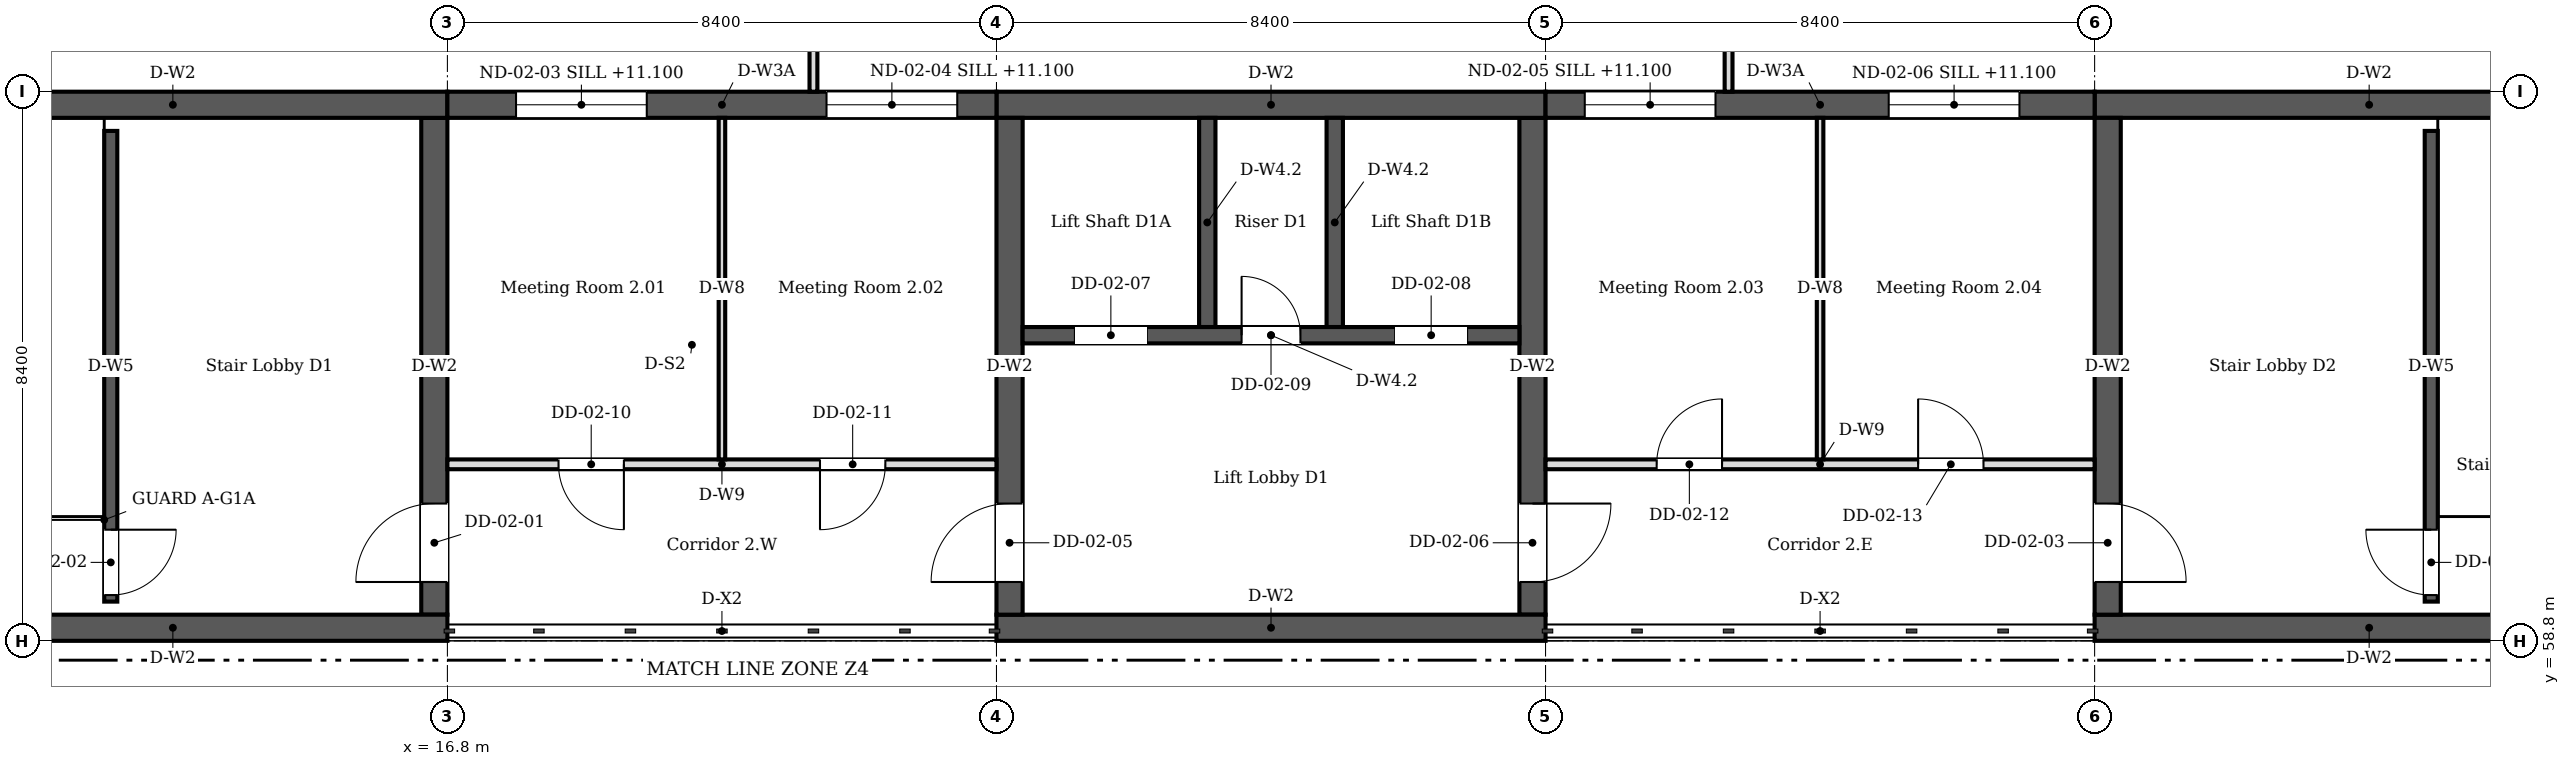
"""IFC4 building model, lengths in metres.
Left out: names, types, materials, properties, quantities, classifications, styles, units other than length and angle.
Written with IfcOpenShell. Run it as: python <this file> out.ifc"""

import sys

from ifc_helpers import new_model, si_unit, direction, frame, frame_2d, origin, place, context, subcontext, project, spatial, rectangle, extrude, element, fill, save


model = new_model("IFC4")
c1 = context("Model", 3, precision=1e-05, world=origin(), true_north=direction((0.0, 1.0)))
c2 = subcontext(c1, "Body", "Model", "MODEL_VIEW")
j1 = project(units=[si_unit("LENGTHUNIT", "METRE"), si_unit("PLANEANGLEUNIT", "RADIAN")], contexts=[c1])
p1 = place(None, origin())
s1 = spatial("IfcSite", under=j1, at=p1, CompositionType="ELEMENT")
p2 = place(p1, origin())
s2 = spatial("IfcBuilding", under=s1, at=p2, CompositionType="ELEMENT")
p3 = place(p2, frame((0.0, 0.0, 10.2)))
s3 = spatial("IfcBuildingStorey", under=s2, at=p3, CompositionType="ELEMENT", Elevation=10.2)
for number, where, z_axis, x_axis in (
    (1, (8.4, 59.0, 0.0), (0.0, 0.0, 1.0), (1.0, 0.0, 0.0)),
    (2, (8.4, 67.0, 0.0), (0.0, 0.0, 1.0), (1.0, 0.0, 0.0)),
):
    element("IfcWall", number, at=place(p3, frame(where, z_axis=z_axis, x_axis=x_axis)), inside=s3, PredefinedType="SOLIDWALL", context=c2, shape_type="SweptSolid", body=[
        extrude(rectangle(XDim=8.4, YDim=0.4, at=frame_2d((4.2, 0.0))), origin(), (0.0, 0.0, 1.0), 3.92),
    ])
p4 = place(p3, frame((16.6, 59.2, 0.0), z_axis=(0.0, 0.0, 1.0), x_axis=(0.0, 1.0, 0.0)))
e3 = element("IfcWall", 3, at=p4, inside=s3, PredefinedType="SOLIDWALL", context=c2, shape_type="SweptSolid", body=[
    extrude(rectangle(XDim=7.6, YDim=0.4, at=frame_2d((3.8, 0.0))), origin(), (0.0, 0.0, 1.0), 3.92),
])
p5 = place(p4, frame((0.5, 0.0, 0.0)))
e4 = element("IfcOpeningElement", 4, at=p5, cuts=e3, PredefinedType="OPENING", context=c2, shape_type="SweptSolid", body=[
    extrude(rectangle(XDim=1.2, YDim=2.1, at=frame_2d((0.6, 1.05))), frame((0.0, 0.21, 0.0), z_axis=(0.0, -1.0, 0.0), x_axis=(1.0, 0.0, 0.0)), (0.0, 0.0, 1.0), 0.42),
])
for number, where, z_axis, x_axis in (
    (5, (25.2, 59.0, 0.0), (0.0, 0.0, 1.0), (1.0, 0.0, 0.0)),
    (6, (25.2, 67.0, 0.0), (0.0, 0.0, 1.0), (1.0, 0.0, 0.0)),
):
    element("IfcWall", number, at=place(p3, frame(where, z_axis=z_axis, x_axis=x_axis)), inside=s3, PredefinedType="SOLIDWALL", context=c2, shape_type="SweptSolid", body=[
        extrude(rectangle(XDim=8.4, YDim=0.4, at=frame_2d((4.2, 0.0))), origin(), (0.0, 0.0, 1.0), 3.92),
    ])
p6 = place(p3, frame((25.4, 59.2, 0.0), z_axis=(0.0, 0.0, 1.0), x_axis=(0.0, 1.0, 0.0)))
e7 = element("IfcWall", 7, at=p6, inside=s3, PredefinedType="SOLIDWALL", context=c2, shape_type="SweptSolid", body=[
    extrude(rectangle(XDim=7.6, YDim=0.4, at=frame_2d((3.8, 0.0))), origin(), (0.0, 0.0, 1.0), 3.92),
])
p7 = place(p6, frame((0.5, 0.0, 0.0)))
e8 = element("IfcOpeningElement", 8, at=p7, cuts=e7, PredefinedType="OPENING", context=c2, shape_type="SweptSolid", body=[
    extrude(rectangle(XDim=1.2, YDim=2.1, at=frame_2d((0.6, 1.05))), frame((0.0, 0.21, 0.0), z_axis=(0.0, -1.0, 0.0), x_axis=(1.0, 0.0, 0.0)), (0.0, 0.0, 1.0), 0.42),
])
p8 = place(p3, frame((33.4, 59.2, 0.0), z_axis=(0.0, 0.0, 1.0), x_axis=(0.0, 1.0, 0.0)))
e9 = element("IfcWall", 9, at=p8, inside=s3, PredefinedType="SOLIDWALL", context=c2, shape_type="SweptSolid", body=[
    extrude(rectangle(XDim=7.6, YDim=0.4, at=frame_2d((3.8, 0.0))), origin(), (0.0, 0.0, 1.0), 3.92),
])
p9 = place(p8, frame((0.5, 0.0, 0.0)))
e10 = element("IfcOpeningElement", 10, at=p9, cuts=e9, PredefinedType="OPENING", context=c2, shape_type="SweptSolid", body=[
    extrude(rectangle(XDim=1.2, YDim=2.1, at=frame_2d((0.6, 1.05))), frame((0.0, 0.21, 0.0), z_axis=(0.0, -1.0, 0.0), x_axis=(1.0, 0.0, 0.0)), (0.0, 0.0, 1.0), 0.42),
])
for number, where, z_axis, x_axis in (
    (11, (42.0, 59.0, 0.0), (0.0, 0.0, 1.0), (1.0, 0.0, 0.0)),
    (12, (42.0, 67.0, 0.0), (0.0, 0.0, 1.0), (1.0, 0.0, 0.0)),
):
    element("IfcWall", number, at=place(p3, frame(where, z_axis=z_axis, x_axis=x_axis)), inside=s3, PredefinedType="SOLIDWALL", context=c2, shape_type="SweptSolid", body=[
        extrude(rectangle(XDim=8.4, YDim=0.4, at=frame_2d((4.2, 0.0))), origin(), (0.0, 0.0, 1.0), 3.92),
    ])
p10 = place(p3, frame((42.2, 59.2, 0.0), z_axis=(0.0, 0.0, 1.0), x_axis=(0.0, 1.0, 0.0)))
e13 = element("IfcWall", 13, at=p10, inside=s3, PredefinedType="SOLIDWALL", context=c2, shape_type="SweptSolid", body=[
    extrude(rectangle(XDim=7.6, YDim=0.4, at=frame_2d((3.8, 0.0))), origin(), (0.0, 0.0, 1.0), 3.92),
])
p11 = place(p10, frame((0.5, 0.0, 0.0)))
e14 = element("IfcOpeningElement", 14, at=p11, cuts=e13, PredefinedType="OPENING", context=c2, shape_type="SweptSolid", body=[
    extrude(rectangle(XDim=1.2, YDim=2.1, at=frame_2d((0.6, 1.05))), frame((0.0, 0.21, 0.0), z_axis=(0.0, -1.0, 0.0), x_axis=(1.0, 0.0, 0.0)), (0.0, 0.0, 1.0), 0.42),
])
p12 = place(p3, frame((25.6, 63.475, 0.0), z_axis=(0.0, 0.0, 1.0), x_axis=(1.0, 0.0, 0.0)))
e15 = element("IfcWall", 15, at=p12, inside=s3, PredefinedType="SOLIDWALL", context=c2, shape_type="SweptSolid", body=[
    extrude(rectangle(XDim=7.6, YDim=0.25, at=frame_2d((3.8, 0.0))), origin(), (0.0, 0.0, 1.0), 4.8),
])
p13 = place(p12, frame((0.8, 0.0, 0.0)))
e16 = element("IfcOpeningElement", 16, at=p13, cuts=e15, PredefinedType="OPENING", context=c2, shape_type="SweptSolid", body=[
    extrude(rectangle(XDim=1.1, YDim=2.1, at=frame_2d((0.55, 1.05))), frame((0.0, 0.135, 0.0), z_axis=(0.0, -1.0, 0.0), x_axis=(1.0, 0.0, 0.0)), (0.0, 0.0, 1.0), 0.27),
])
p14 = place(p12, frame((5.7, 0.0, 0.0)))
e17 = element("IfcOpeningElement", 17, at=p14, cuts=e15, PredefinedType="OPENING", context=c2, shape_type="SweptSolid", body=[
    extrude(rectangle(XDim=1.1, YDim=2.1, at=frame_2d((0.55, 1.05))), frame((0.0, 0.135, 0.0), z_axis=(0.0, -1.0, 0.0), x_axis=(1.0, 0.0, 0.0)), (0.0, 0.0, 1.0), 0.27),
])
p15 = place(p12, frame((3.35, 0.0, 0.0)))
e18 = element("IfcOpeningElement", 18, at=p15, cuts=e15, PredefinedType="OPENING", context=c2, shape_type="SweptSolid", body=[
    extrude(rectangle(XDim=0.9, YDim=2.1, at=frame_2d((0.45, 1.05))), frame((0.0, 0.135, 0.0), z_axis=(0.0, -1.0, 0.0), x_axis=(1.0, 0.0, 0.0)), (0.0, 0.0, 1.0), 0.27),
])
for number, where, z_axis, x_axis in (
    (19, (28.425, 63.6, 0.0), (0.0, 0.0, 1.0), (0.0, 1.0, 0.0)),
    (20, (30.375, 63.6, 0.0), (0.0, 0.0, 1.0), (0.0, 1.0, 0.0)),
):
    element("IfcWall", number, at=place(p3, frame(where, z_axis=z_axis, x_axis=x_axis)), inside=s3, PredefinedType="SOLIDWALL", context=c2, shape_type="SweptSolid", body=[
        extrude(rectangle(XDim=3.2, YDim=0.25, at=frame_2d((1.6, 0.0))), origin(), (0.0, 0.0, 1.0), 4.8),
    ])
p16 = place(p3, frame((11.65, 59.4, 0.0), z_axis=(0.0, 0.0, 1.0), x_axis=(0.0, 1.0, 0.0)))
e21 = element("IfcWall", 21, at=p16, inside=s3, PredefinedType="SOLIDWALL", context=c2, shape_type="SweptSolid", body=[
    extrude(rectangle(XDim=7.2, YDim=0.2, at=frame_2d((3.6, 0.0))), origin(), (0.0, 0.0, 1.0), 3.92),
])
p17 = place(p16, frame((0.1, 0.0, 0.0)))
e22 = element("IfcOpeningElement", 22, at=p17, cuts=e21, PredefinedType="OPENING", context=c2, shape_type="SweptSolid", body=[
    extrude(rectangle(XDim=1.0, YDim=2.1, at=frame_2d((0.5, 1.05))), frame((0.0, 0.11, 0.0), z_axis=(0.0, -1.0, 0.0), x_axis=(1.0, 0.0, 0.0)), (0.0, 0.0, 1.0), 0.22),
])
p18 = place(p3, frame((47.15, 59.4, 0.0), z_axis=(0.0, 0.0, 1.0), x_axis=(0.0, 1.0, 0.0)))
e23 = element("IfcWall", 23, at=p18, inside=s3, PredefinedType="SOLIDWALL", context=c2, shape_type="SweptSolid", body=[
    extrude(rectangle(XDim=7.2, YDim=0.2, at=frame_2d((3.6, 0.0))), origin(), (0.0, 0.0, 1.0), 3.92),
])
p19 = place(p18, frame((0.1, 0.0, 0.0)))
e24 = element("IfcOpeningElement", 24, at=p19, cuts=e23, PredefinedType="OPENING", context=c2, shape_type="SweptSolid", body=[
    extrude(rectangle(XDim=1.0, YDim=2.1, at=frame_2d((0.5, 1.05))), frame((0.0, 0.11, 0.0), z_axis=(0.0, -1.0, 0.0), x_axis=(1.0, 0.0, 0.0)), (0.0, 0.0, 1.0), 0.22),
])
p20 = place(p2, origin())
s4 = spatial("IfcBuildingStorey", under=s2, at=p20, CompositionType="ELEMENT", Elevation=0.0)
for number, where, z_axis, x_axis in (
    (25, (22.4, 67.2, 0.0), (0.0, 0.0, 1.0), (0.0, 1.0, 0.0)),
    (26, (36.4, 67.2, 0.0), (0.0, 0.0, 1.0), (0.0, 1.0, 0.0)),
):
    element("IfcWall", number, at=place(p20, frame(where, z_axis=z_axis, x_axis=x_axis)), inside=s4, PredefinedType="MOVABLE", context=c2, shape_type="SweptSolid", body=[
        extrude(rectangle(XDim=33.6, YDim=0.12, at=frame_2d((16.8, 0.0))), origin(), (0.0, 0.0, 1.0), 14.467),
    ])
p21 = place(p3, frame((16.8, 67.0, 0.0), z_axis=(0.0, 0.0, 1.0), x_axis=(1.0, 0.0, 0.0)))
e27 = element("IfcWall", 27, at=p21, inside=s3, PredefinedType="SOLIDWALL", context=c2, shape_type="SweptSolid", body=[
    extrude(rectangle(XDim=8.4, YDim=0.4, at=frame_2d((4.2, 0.0))), origin(), (0.0, 0.0, 1.0), 3.42),
])
p22 = place(p21, frame((1.05, 0.0, 0.9)))
e28 = element("IfcOpeningElement", 28, at=p22, cuts=e27, PredefinedType="OPENING", context=c2, shape_type="SweptSolid", body=[
    extrude(rectangle(XDim=2.0, YDim=1.2, at=frame_2d((1.0, 0.6))), frame((0.0, 0.21, 0.0), z_axis=(0.0, -1.0, 0.0), x_axis=(1.0, 0.0, 0.0)), (0.0, 0.0, 1.0), 0.42),
])
p23 = place(p21, frame((5.8, 0.0, 0.9)))
e29 = element("IfcOpeningElement", 29, at=p23, cuts=e27, PredefinedType="OPENING", context=c2, shape_type="SweptSolid", body=[
    extrude(rectangle(XDim=2.0, YDim=1.2, at=frame_2d((1.0, 0.6))), frame((0.0, 0.21, 0.0), z_axis=(0.0, -1.0, 0.0), x_axis=(1.0, 0.0, 0.0)), (0.0, 0.0, 1.0), 0.42),
])
p24 = place(p3, frame((33.6, 67.0, 0.0), z_axis=(0.0, 0.0, 1.0), x_axis=(1.0, 0.0, 0.0)))
e30 = element("IfcWall", 30, at=p24, inside=s3, PredefinedType="SOLIDWALL", context=c2, shape_type="SweptSolid", body=[
    extrude(rectangle(XDim=8.4, YDim=0.4, at=frame_2d((4.2, 0.0))), origin(), (0.0, 0.0, 1.0), 3.42),
])
p25 = place(p24, frame((0.6, 0.0, 0.9)))
e31 = element("IfcOpeningElement", 31, at=p25, cuts=e30, PredefinedType="OPENING", context=c2, shape_type="SweptSolid", body=[
    extrude(rectangle(XDim=2.0, YDim=1.2, at=frame_2d((1.0, 0.6))), frame((0.0, 0.21, 0.0), z_axis=(0.0, -1.0, 0.0), x_axis=(1.0, 0.0, 0.0)), (0.0, 0.0, 1.0), 0.42),
])
p26 = place(p24, frame((5.25, 0.0, 0.9)))
e32 = element("IfcOpeningElement", 32, at=p26, cuts=e30, PredefinedType="OPENING", context=c2, shape_type="SweptSolid", body=[
    extrude(rectangle(XDim=2.0, YDim=1.2, at=frame_2d((1.0, 0.6))), frame((0.0, 0.21, 0.0), z_axis=(0.0, -1.0, 0.0), x_axis=(1.0, 0.0, 0.0)), (0.0, 0.0, 1.0), 0.42),
])
p27 = place(p3, frame((16.8, 61.5, 0.0), z_axis=(0.0, 0.0, 1.0), x_axis=(1.0, 0.0, 0.0)))
e33 = element("IfcWall", 33, at=p27, inside=s3, PredefinedType="PARTITIONING", context=c2, shape_type="SweptSolid", body=[
    extrude(rectangle(XDim=8.4, YDim=0.15, at=frame_2d((4.2, 0.0))), origin(), (0.0, 0.0, 1.0), 3.92),
])
p28 = place(p27, frame((1.7, 0.0, 0.0)))
e34 = element("IfcOpeningElement", 34, at=p28, cuts=e33, PredefinedType="OPENING", context=c2, shape_type="SweptSolid", body=[
    extrude(rectangle(XDim=1.0, YDim=2.1, at=frame_2d((0.5, 1.05))), frame((0.0, 0.085, 0.0), z_axis=(0.0, -1.0, 0.0), x_axis=(1.0, 0.0, 0.0)), (0.0, 0.0, 1.0), 0.17),
])
p29 = place(p27, frame((5.7, 0.0, 0.0)))
e35 = element("IfcOpeningElement", 35, at=p29, cuts=e33, PredefinedType="OPENING", context=c2, shape_type="SweptSolid", body=[
    extrude(rectangle(XDim=1.0, YDim=2.1, at=frame_2d((0.5, 1.05))), frame((0.0, 0.085, 0.0), z_axis=(0.0, -1.0, 0.0), x_axis=(1.0, 0.0, 0.0)), (0.0, 0.0, 1.0), 0.17),
])
p30 = place(p3, frame((21.0, 61.575, 0.0), z_axis=(0.0, 0.0, 1.0), x_axis=(0.0, 1.0, 0.0)))
e36 = element("IfcWall", 36, at=p30, inside=s3, PredefinedType="PARTITIONING", context=c2, shape_type="SweptSolid", body=[
    extrude(rectangle(XDim=5.225, YDim=0.1, at=frame_2d((2.613, 0.0))), origin(), (0.0, 0.0, 1.0), 3.92),
])
p31 = place(p3, frame((33.6, 61.5, 0.0), z_axis=(0.0, 0.0, 1.0), x_axis=(1.0, 0.0, 0.0)))
e37 = element("IfcWall", 37, at=p31, inside=s3, PredefinedType="PARTITIONING", context=c2, shape_type="SweptSolid", body=[
    extrude(rectangle(XDim=8.4, YDim=0.15, at=frame_2d((4.2, 0.0))), origin(), (0.0, 0.0, 1.0), 3.92),
])
p32 = place(p31, frame((1.7, 0.0, 0.0)))
e38 = element("IfcOpeningElement", 38, at=p32, cuts=e37, PredefinedType="OPENING", context=c2, shape_type="SweptSolid", body=[
    extrude(rectangle(XDim=1.0, YDim=2.1, at=frame_2d((0.5, 1.05))), frame((0.0, 0.085, 0.0), z_axis=(0.0, -1.0, 0.0), x_axis=(1.0, 0.0, 0.0)), (0.0, 0.0, 1.0), 0.17),
])
p33 = place(p31, frame((5.7, 0.0, 0.0)))
e39 = element("IfcOpeningElement", 39, at=p33, cuts=e37, PredefinedType="OPENING", context=c2, shape_type="SweptSolid", body=[
    extrude(rectangle(XDim=1.0, YDim=2.1, at=frame_2d((0.5, 1.05))), frame((0.0, 0.085, 0.0), z_axis=(0.0, -1.0, 0.0), x_axis=(1.0, 0.0, 0.0)), (0.0, 0.0, 1.0), 0.17),
])
p34 = place(p3, frame((37.8, 61.575, 0.0), z_axis=(0.0, 0.0, 1.0), x_axis=(0.0, 1.0, 0.0)))
e40 = element("IfcWall", 40, at=p34, inside=s3, PredefinedType="PARTITIONING", context=c2, shape_type="SweptSolid", body=[
    extrude(rectangle(XDim=5.225, YDim=0.1, at=frame_2d((2.613, 0.0))), origin(), (0.0, 0.0, 1.0), 3.92),
])
p35 = place(p5, origin())
e41 = element("IfcDoor", 41, at=p35, inside=s3, OperationType="SINGLE_SWING_LEFT", PredefinedType="DOOR", context=c2, shape_type="SweptSolid", body=[
    extrude(rectangle(XDim=1.2, YDim=2.1, at=frame_2d((0.6, 1.05))), frame((0.0, 0.025, 0.0), z_axis=(0.0, -1.0, 0.0), x_axis=(1.0, 0.0, 0.0)), (0.0, 0.0, 1.0), 0.05),
])
fill(e4, e41)
p36 = place(p17, origin())
e42 = element("IfcDoor", 42, at=p36, inside=s3, OperationType="SINGLE_SWING_LEFT", PredefinedType="DOOR", context=c2, shape_type="SweptSolid", body=[
    extrude(rectangle(XDim=1.0, YDim=2.1, at=frame_2d((0.5, 1.05))), frame((0.0, 0.025, 0.0), z_axis=(0.0, -1.0, 0.0), x_axis=(1.0, 0.0, 0.0)), (0.0, 0.0, 1.0), 0.05),
])
fill(e22, e42)
p37 = place(p11, origin())
e43 = element("IfcDoor", 43, at=p37, inside=s3, OperationType="SINGLE_SWING_LEFT", PredefinedType="DOOR", context=c2, shape_type="SweptSolid", body=[
    extrude(rectangle(XDim=1.2, YDim=2.1, at=frame_2d((0.6, 1.05))), frame((0.0, 0.025, 0.0), z_axis=(0.0, -1.0, 0.0), x_axis=(1.0, 0.0, 0.0)), (0.0, 0.0, 1.0), 0.05),
])
fill(e14, e43)
p38 = place(p19, origin())
e44 = element("IfcDoor", 44, at=p38, inside=s3, OperationType="SINGLE_SWING_LEFT", PredefinedType="DOOR", context=c2, shape_type="SweptSolid", body=[
    extrude(rectangle(XDim=1.0, YDim=2.1, at=frame_2d((0.5, 1.05))), frame((0.0, 0.025, 0.0), z_axis=(0.0, -1.0, 0.0), x_axis=(1.0, 0.0, 0.0)), (0.0, 0.0, 1.0), 0.05),
])
fill(e24, e44)
p39 = place(p7, origin())
e45 = element("IfcDoor", 45, at=p39, inside=s3, OperationType="SINGLE_SWING_LEFT", PredefinedType="DOOR", context=c2, shape_type="SweptSolid", body=[
    extrude(rectangle(XDim=1.2, YDim=2.1, at=frame_2d((0.6, 1.05))), frame((0.0, 0.025, 0.0), z_axis=(0.0, -1.0, 0.0), x_axis=(1.0, 0.0, 0.0)), (0.0, 0.0, 1.0), 0.05),
])
fill(e8, e45)
p40 = place(p9, origin())
e46 = element("IfcDoor", 46, at=p40, inside=s3, OperationType="SINGLE_SWING_LEFT", PredefinedType="DOOR", context=c2, shape_type="SweptSolid", body=[
    extrude(rectangle(XDim=1.2, YDim=2.1, at=frame_2d((0.6, 1.05))), frame((0.0, 0.025, 0.0), z_axis=(0.0, -1.0, 0.0), x_axis=(1.0, 0.0, 0.0)), (0.0, 0.0, 1.0), 0.05),
])
fill(e10, e46)
p41 = place(p13, origin())
e47 = element("IfcDoor", 47, at=p41, inside=s3, OperationType="DOUBLE_DOOR_SLIDING", PredefinedType="DOOR", context=c2, shape_type="SweptSolid", body=[
    extrude(rectangle(XDim=1.1, YDim=2.1, at=frame_2d((0.55, 1.05))), frame((0.0, 0.025, 0.0), z_axis=(0.0, -1.0, 0.0), x_axis=(1.0, 0.0, 0.0)), (0.0, 0.0, 1.0), 0.05),
])
fill(e16, e47)
p42 = place(p14, origin())
e48 = element("IfcDoor", 48, at=p42, inside=s3, OperationType="DOUBLE_DOOR_SLIDING", PredefinedType="DOOR", context=c2, shape_type="SweptSolid", body=[
    extrude(rectangle(XDim=1.1, YDim=2.1, at=frame_2d((0.55, 1.05))), frame((0.0, 0.025, 0.0), z_axis=(0.0, -1.0, 0.0), x_axis=(1.0, 0.0, 0.0)), (0.0, 0.0, 1.0), 0.05),
])
fill(e17, e48)
p43 = place(p15, origin())
e49 = element("IfcDoor", 49, at=p43, inside=s3, OperationType="SINGLE_SWING_LEFT", PredefinedType="DOOR", context=c2, shape_type="SweptSolid", body=[
    extrude(rectangle(XDim=0.9, YDim=2.1, at=frame_2d((0.45, 1.05))), frame((0.0, 0.025, 0.0), z_axis=(0.0, -1.0, 0.0), x_axis=(1.0, 0.0, 0.0)), (0.0, 0.0, 1.0), 0.05),
])
fill(e18, e49)
p44 = place(p22, origin())
e50 = element("IfcWindow", 50, at=p44, inside=s3, PartitioningType="SINGLE_PANEL", PredefinedType="WINDOW", context=c2, shape_type="SweptSolid", body=[
    extrude(rectangle(XDim=2.0, YDim=1.2, at=frame_2d((1.0, 0.6))), frame((0.0, 0.03, 0.0), z_axis=(0.0, -1.0, 0.0), x_axis=(1.0, 0.0, 0.0)), (0.0, 0.0, 1.0), 0.06),
])
fill(e28, e50)
p45 = place(p23, origin())
e51 = element("IfcWindow", 51, at=p45, inside=s3, PartitioningType="SINGLE_PANEL", PredefinedType="WINDOW", context=c2, shape_type="SweptSolid", body=[
    extrude(rectangle(XDim=2.0, YDim=1.2, at=frame_2d((1.0, 0.6))), frame((0.0, 0.03, 0.0), z_axis=(0.0, -1.0, 0.0), x_axis=(1.0, 0.0, 0.0)), (0.0, 0.0, 1.0), 0.06),
])
fill(e29, e51)
p46 = place(p25, origin())
e52 = element("IfcWindow", 52, at=p46, inside=s3, PartitioningType="SINGLE_PANEL", PredefinedType="WINDOW", context=c2, shape_type="SweptSolid", body=[
    extrude(rectangle(XDim=2.0, YDim=1.2, at=frame_2d((1.0, 0.6))), frame((0.0, 0.03, 0.0), z_axis=(0.0, -1.0, 0.0), x_axis=(1.0, 0.0, 0.0)), (0.0, 0.0, 1.0), 0.06),
])
fill(e31, e52)
p47 = place(p26, origin())
e53 = element("IfcWindow", 53, at=p47, inside=s3, PartitioningType="SINGLE_PANEL", PredefinedType="WINDOW", context=c2, shape_type="SweptSolid", body=[
    extrude(rectangle(XDim=2.0, YDim=1.2, at=frame_2d((1.0, 0.6))), frame((0.0, 0.03, 0.0), z_axis=(0.0, -1.0, 0.0), x_axis=(1.0, 0.0, 0.0)), (0.0, 0.0, 1.0), 0.06),
])
fill(e32, e53)
p48 = place(p28, origin())
e54 = element("IfcDoor", 54, at=p48, inside=s3, OperationType="SINGLE_SWING_LEFT", PredefinedType="DOOR", context=c2, shape_type="SweptSolid", body=[
    extrude(rectangle(XDim=1.0, YDim=2.1, at=frame_2d((0.5, 1.05))), frame((0.0, 0.025, 0.0), z_axis=(0.0, -1.0, 0.0), x_axis=(1.0, 0.0, 0.0)), (0.0, 0.0, 1.0), 0.05),
])
fill(e34, e54)
p49 = place(p29, origin())
e55 = element("IfcDoor", 55, at=p49, inside=s3, OperationType="SINGLE_SWING_LEFT", PredefinedType="DOOR", context=c2, shape_type="SweptSolid", body=[
    extrude(rectangle(XDim=1.0, YDim=2.1, at=frame_2d((0.5, 1.05))), frame((0.0, 0.025, 0.0), z_axis=(0.0, -1.0, 0.0), x_axis=(1.0, 0.0, 0.0)), (0.0, 0.0, 1.0), 0.05),
])
fill(e35, e55)
p50 = place(p32, origin())
e56 = element("IfcDoor", 56, at=p50, inside=s3, OperationType="SINGLE_SWING_LEFT", PredefinedType="DOOR", context=c2, shape_type="SweptSolid", body=[
    extrude(rectangle(XDim=1.0, YDim=2.1, at=frame_2d((0.5, 1.05))), frame((0.0, 0.025, 0.0), z_axis=(0.0, -1.0, 0.0), x_axis=(1.0, 0.0, 0.0)), (0.0, 0.0, 1.0), 0.05),
])
fill(e38, e56)
p51 = place(p33, origin())
e57 = element("IfcDoor", 57, at=p51, inside=s3, OperationType="SINGLE_SWING_LEFT", PredefinedType="DOOR", context=c2, shape_type="SweptSolid", body=[
    extrude(rectangle(XDim=1.0, YDim=2.1, at=frame_2d((0.5, 1.05))), frame((0.0, 0.025, 0.0), z_axis=(0.0, -1.0, 0.0), x_axis=(1.0, 0.0, 0.0)), (0.0, 0.0, 1.0), 0.05),
])
fill(e39, e57)
save(model, sys.argv[1])
